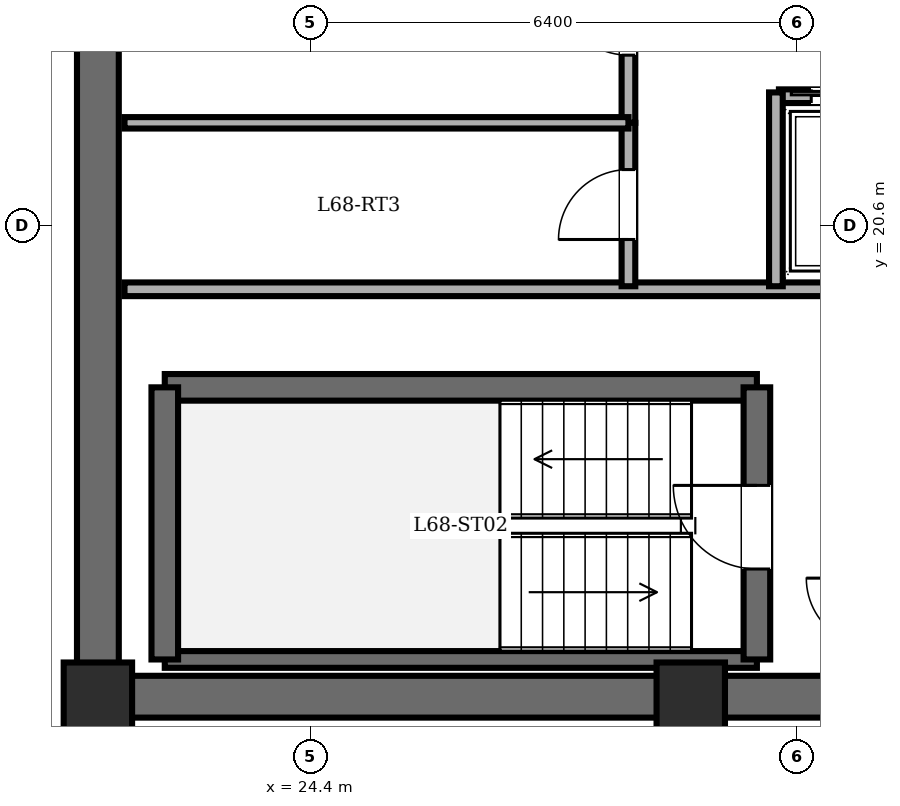
"""IFC4 building model, lengths in metres.
Left out: names, types, materials, properties, quantities, classifications, styles, units other than length and angle.
Written with IfcOpenShell. Run it as: python <this file> out.ifc"""

import sys

from ifc_helpers import new_model, si_unit, direction, frame, frame_2d, origin, origin_2d, place, context, subcontext, project, spatial, rectangle, extrude, element, fill, save


model = new_model("IFC4")
c1 = context("Model", 3, precision=1e-05, world=origin(), true_north=direction((0.0, 1.0)))
c2 = subcontext(c1, "Body", "Model", "MODEL_VIEW")
j1 = project(units=[si_unit("LENGTHUNIT", "METRE"), si_unit("PLANEANGLEUNIT", "RADIAN")], contexts=[c1])
p1 = place(None, origin())
s1 = spatial("IfcSite", under=j1, at=p1, CompositionType="ELEMENT")
p2 = place(p1, origin())
s2 = spatial("IfcBuilding", under=s1, at=p2, CompositionType="ELEMENT")
p3 = place(p2, frame((0.0, 0.0, 262.45)))
s3 = spatial("IfcBuildingStorey", under=s2, at=p3, CompositionType="ELEMENT", Elevation=262.45)
for number, where, z_axis, x_axis in (
    (1, (21.6, 14.4, 0.0), (0.0, 0.0, 1.0), (1.0, 0.0, 0.0)),
    (2, (29.4, 14.4, 0.0), (0.0, 0.0, 1.0), (1.0, 0.0, 0.0)),
):
    element("IfcColumn", number, at=place(p3, frame(where, z_axis=z_axis, x_axis=x_axis)), inside=s3, PredefinedType="COLUMN", context=c2, shape_type="SweptSolid", body=[
        extrude(rectangle(XDim=0.9, YDim=0.9, at=origin_2d()), origin(), (0.0, 0.0, 1.0), 3.65),
    ])
p4 = place(p3, frame((21.6, 14.4, 0.0), z_axis=(0.0, 0.0, 1.0), x_axis=(0.0, 1.0, 0.0)))
e3 = element("IfcWall", 3, at=p4, inside=s3, PredefinedType="SHEAR", context=c2, shape_type="SweptSolid", body=[
    extrude(rectangle(XDim=19.2, YDim=0.55, at=frame_2d((9.6, 0.0))), origin(), (0.0, 0.0, 1.0), 3.45),
])
p5 = place(p3, frame((37.2, 14.4, 0.0), z_axis=(0.0, 0.0, 1.0), x_axis=(-1.0, 0.0, 0.0)))
e4 = element("IfcWall", 4, at=p5, inside=s3, PredefinedType="SHEAR", context=c2, shape_type="SweptSolid", body=[
    extrude(rectangle(XDim=15.6, YDim=0.55, at=frame_2d((7.8, 0.0))), origin(), (0.0, 0.0, 1.0), 3.45),
])
p6 = place(p3, frame((22.48, 18.47, 0.0), z_axis=(0.0, 0.0, 1.0), x_axis=(1.0, 0.0, 0.0)))
e5 = element("IfcWall", 5, at=p6, inside=s3, PredefinedType="SOLIDWALL", context=c2, shape_type="SweptSolid", body=[
    extrude(rectangle(XDim=7.79, YDim=0.35, at=frame_2d((3.895, 0.0))), origin(), (0.0, 0.0, 1.0), 3.45),
])
p7 = place(p3, frame((22.48, 14.89, 0.0), z_axis=(0.0, 0.0, 1.0), x_axis=(1.0, 0.0, 0.0)))
e6 = element("IfcWall", 6, at=p7, inside=s3, PredefinedType="PARTITIONING", context=c2, shape_type="SweptSolid", body=[
    extrude(rectangle(XDim=7.79, YDim=0.22, at=frame_2d((3.895, 0.0))), origin(), (0.0, 0.0, 1.0), 3.45),
])
p8 = place(p3, frame((22.48, 14.89, 0.0), z_axis=(0.0, 0.0, 1.0), x_axis=(0.0, 1.0, 0.0)))
e7 = element("IfcWall", 7, at=p8, inside=s3, PredefinedType="SOLIDWALL", context=c2, shape_type="SweptSolid", body=[
    extrude(rectangle(XDim=3.58, YDim=0.35, at=frame_2d((1.79, 0.0))), origin(), (0.0, 0.0, 1.0), 3.45),
])
p9 = place(p3, frame((30.27, 14.89, 0.0), z_axis=(0.0, 0.0, 1.0), x_axis=(0.0, 1.0, 0.0)))
e8 = element("IfcWall", 8, at=p9, inside=s3, PredefinedType="SOLIDWALL", context=c2, shape_type="SweptSolid", body=[
    extrude(rectangle(XDim=3.58, YDim=0.35, at=frame_2d((1.79, 0.0))), origin(), (0.0, 0.0, 1.0), 3.45),
])
p10 = place(p9, frame((1.19, 0.0, 0.0)))
e9 = element("IfcOpeningElement", 9, at=p10, cuts=e8, PredefinedType="OPENING", context=c2, shape_type="SweptSolid", body=[
    extrude(rectangle(XDim=1.1, YDim=2.15, at=frame_2d((0.55, 1.075))), frame((0.0, 0.185, 0.0), z_axis=(0.0, -1.0, 0.0), x_axis=(1.0, 0.0, 0.0)), (0.0, 0.0, 1.0), 0.37),
])
p11 = place(p3, frame((21.95, 19.76, 0.0), z_axis=(0.0, 0.0, 1.0), x_axis=(1.0, 0.0, 0.0)))
e10 = element("IfcWall", 10, at=p11, inside=s3, PredefinedType="PARTITIONING", context=c2, shape_type="SweptSolid", body=[
    extrude(rectangle(XDim=14.87, YDim=0.18, at=frame_2d((7.435, 0.0))), origin(), (0.0, 0.0, 1.0), 3.45),
])
p12 = place(p3, frame((30.56, 22.3, 0.0), z_axis=(0.0, 0.0, 1.0), x_axis=(1.0, 0.0, 0.0)))
e11 = element("IfcWall", 11, at=p12, inside=s3, PredefinedType="PARTITIONING", context=c2, shape_type="SweptSolid", body=[
    extrude(rectangle(XDim=1.9, YDim=0.18, at=frame_2d((0.95, 0.0))), origin(), (0.0, 0.0, 1.0), 3.45),
])
p13 = place(p12, frame((0.425, 0.0, 0.0)))
e12 = element("IfcOpeningElement", 12, at=p13, cuts=e11, PredefinedType="OPENING", context=c2, shape_type="SweptSolid", body=[
    extrude(rectangle(XDim=1.05, YDim=2.2, at=frame_2d((0.525, 1.1))), frame((0.0, 0.1, 0.0), z_axis=(0.0, -1.0, 0.0), x_axis=(1.0, 0.0, 0.0)), (0.0, 0.0, 1.0), 0.2),
])
p14 = place(p3, frame((30.52, 19.8, 0.0), z_axis=(0.0, 0.0, 1.0), x_axis=(0.0, 1.0, 0.0)))
e13 = element("IfcWall", 13, at=p14, inside=s3, PredefinedType="PARTITIONING", context=c2, shape_type="SweptSolid", body=[
    extrude(rectangle(XDim=2.55, YDim=0.18, at=frame_2d((1.275, 0.0))), origin(), (0.0, 0.0, 1.0), 3.45),
])
p15 = place(p3, frame((28.58, 21.95, 0.0), z_axis=(0.0, 0.0, 1.0), x_axis=(0.0, 1.0, 0.0)))
e14 = element("IfcWall", 14, at=p15, inside=s3, PredefinedType="PARTITIONING", context=c2, shape_type="SweptSolid", body=[
    extrude(rectangle(XDim=2.7, YDim=0.18, at=frame_2d((1.35, 0.0))), origin(), (0.0, 0.0, 1.0), 3.45),
])
p16 = place(p15, frame((0.89, 0.0, 0.0)))
e15 = element("IfcOpeningElement", 15, at=p16, cuts=e14, PredefinedType="OPENING", context=c2, shape_type="SweptSolid", body=[
    extrude(rectangle(XDim=0.92, YDim=2.1, at=frame_2d((0.46, 1.05))), frame((0.0, 0.1, 0.0), z_axis=(0.0, -1.0, 0.0), x_axis=(1.0, 0.0, 0.0)), (0.0, 0.0, 1.0), 0.2),
])
p17 = place(p3, frame((28.58, 19.8, 0.0), z_axis=(0.0, 0.0, 1.0), x_axis=(0.0, 1.0, 0.0)))
e16 = element("IfcWall", 16, at=p17, inside=s3, PredefinedType="PARTITIONING", context=c2, shape_type="SweptSolid", body=[
    extrude(rectangle(XDim=2.15, YDim=0.18, at=frame_2d((1.075, 0.0))), origin(), (0.0, 0.0, 1.0), 3.45),
])
p18 = place(p17, frame((0.615, 0.0, 0.0)))
e17 = element("IfcOpeningElement", 17, at=p18, cuts=e16, PredefinedType="OPENING", context=c2, shape_type="SweptSolid", body=[
    extrude(rectangle(XDim=0.92, YDim=2.1, at=frame_2d((0.46, 1.05))), frame((0.0, 0.1, 0.0), z_axis=(0.0, -1.0, 0.0), x_axis=(1.0, 0.0, 0.0)), (0.0, 0.0, 1.0), 0.2),
])
p19 = place(p3, frame((21.95, 21.95, 0.0), z_axis=(0.0, 0.0, 1.0), x_axis=(1.0, 0.0, 0.0)))
e18 = element("IfcWall", 18, at=p19, inside=s3, PredefinedType="PARTITIONING", context=c2, shape_type="SweptSolid", body=[
    extrude(rectangle(XDim=6.63, YDim=0.15, at=frame_2d((3.315, 0.0))), origin(), (0.0, 0.0, 1.0), 3.45),
])
p20 = place(p10, origin())
e19 = element("IfcDoor", 19, at=p20, inside=s3, OperationType="SINGLE_SWING_RIGHT", PredefinedType="DOOR", context=c2, shape_type="SweptSolid", body=[
    extrude(rectangle(XDim=1.1, YDim=2.15, at=frame_2d((0.55, 1.075))), frame((0.0, 0.025, 0.0), z_axis=(0.0, -1.0, 0.0), x_axis=(1.0, 0.0, 0.0)), (0.0, 0.0, 1.0), 0.05),
])
fill(e9, e19)
p21 = place(p13, origin())
e20 = element("IfcDoor", 20, at=p21, inside=s3, OperationType="DOUBLE_DOOR_SLIDING", PredefinedType="DOOR", context=c2, shape_type="SweptSolid", body=[
    extrude(rectangle(XDim=1.05, YDim=2.2, at=frame_2d((0.525, 1.1))), frame((0.0, 0.025, 0.0), z_axis=(0.0, -1.0, 0.0), x_axis=(1.0, 0.0, 0.0)), (0.0, 0.0, 1.0), 0.05),
])
fill(e12, e20)
p22 = place(p16, origin())
e21 = element("IfcDoor", 21, at=p22, inside=s3, OperationType="SINGLE_SWING_RIGHT", PredefinedType="DOOR", context=c2, shape_type="SweptSolid", body=[
    extrude(rectangle(XDim=0.92, YDim=2.1, at=frame_2d((0.46, 1.05))), frame((0.0, 0.025, 0.0), z_axis=(0.0, -1.0, 0.0), x_axis=(1.0, 0.0, 0.0)), (0.0, 0.0, 1.0), 0.05),
])
fill(e15, e21)
p23 = place(p18, origin())
e22 = element("IfcDoor", 22, at=p23, inside=s3, OperationType="SINGLE_SWING_LEFT", PredefinedType="DOOR", context=c2, shape_type="SweptSolid", body=[
    extrude(rectangle(XDim=0.92, YDim=2.1, at=frame_2d((0.46, 1.05))), frame((0.0, 0.025, 0.0), z_axis=(0.0, -1.0, 0.0), x_axis=(1.0, 0.0, 0.0)), (0.0, 0.0, 1.0), 0.05),
])
fill(e17, e22)
save(model, sys.argv[1])
